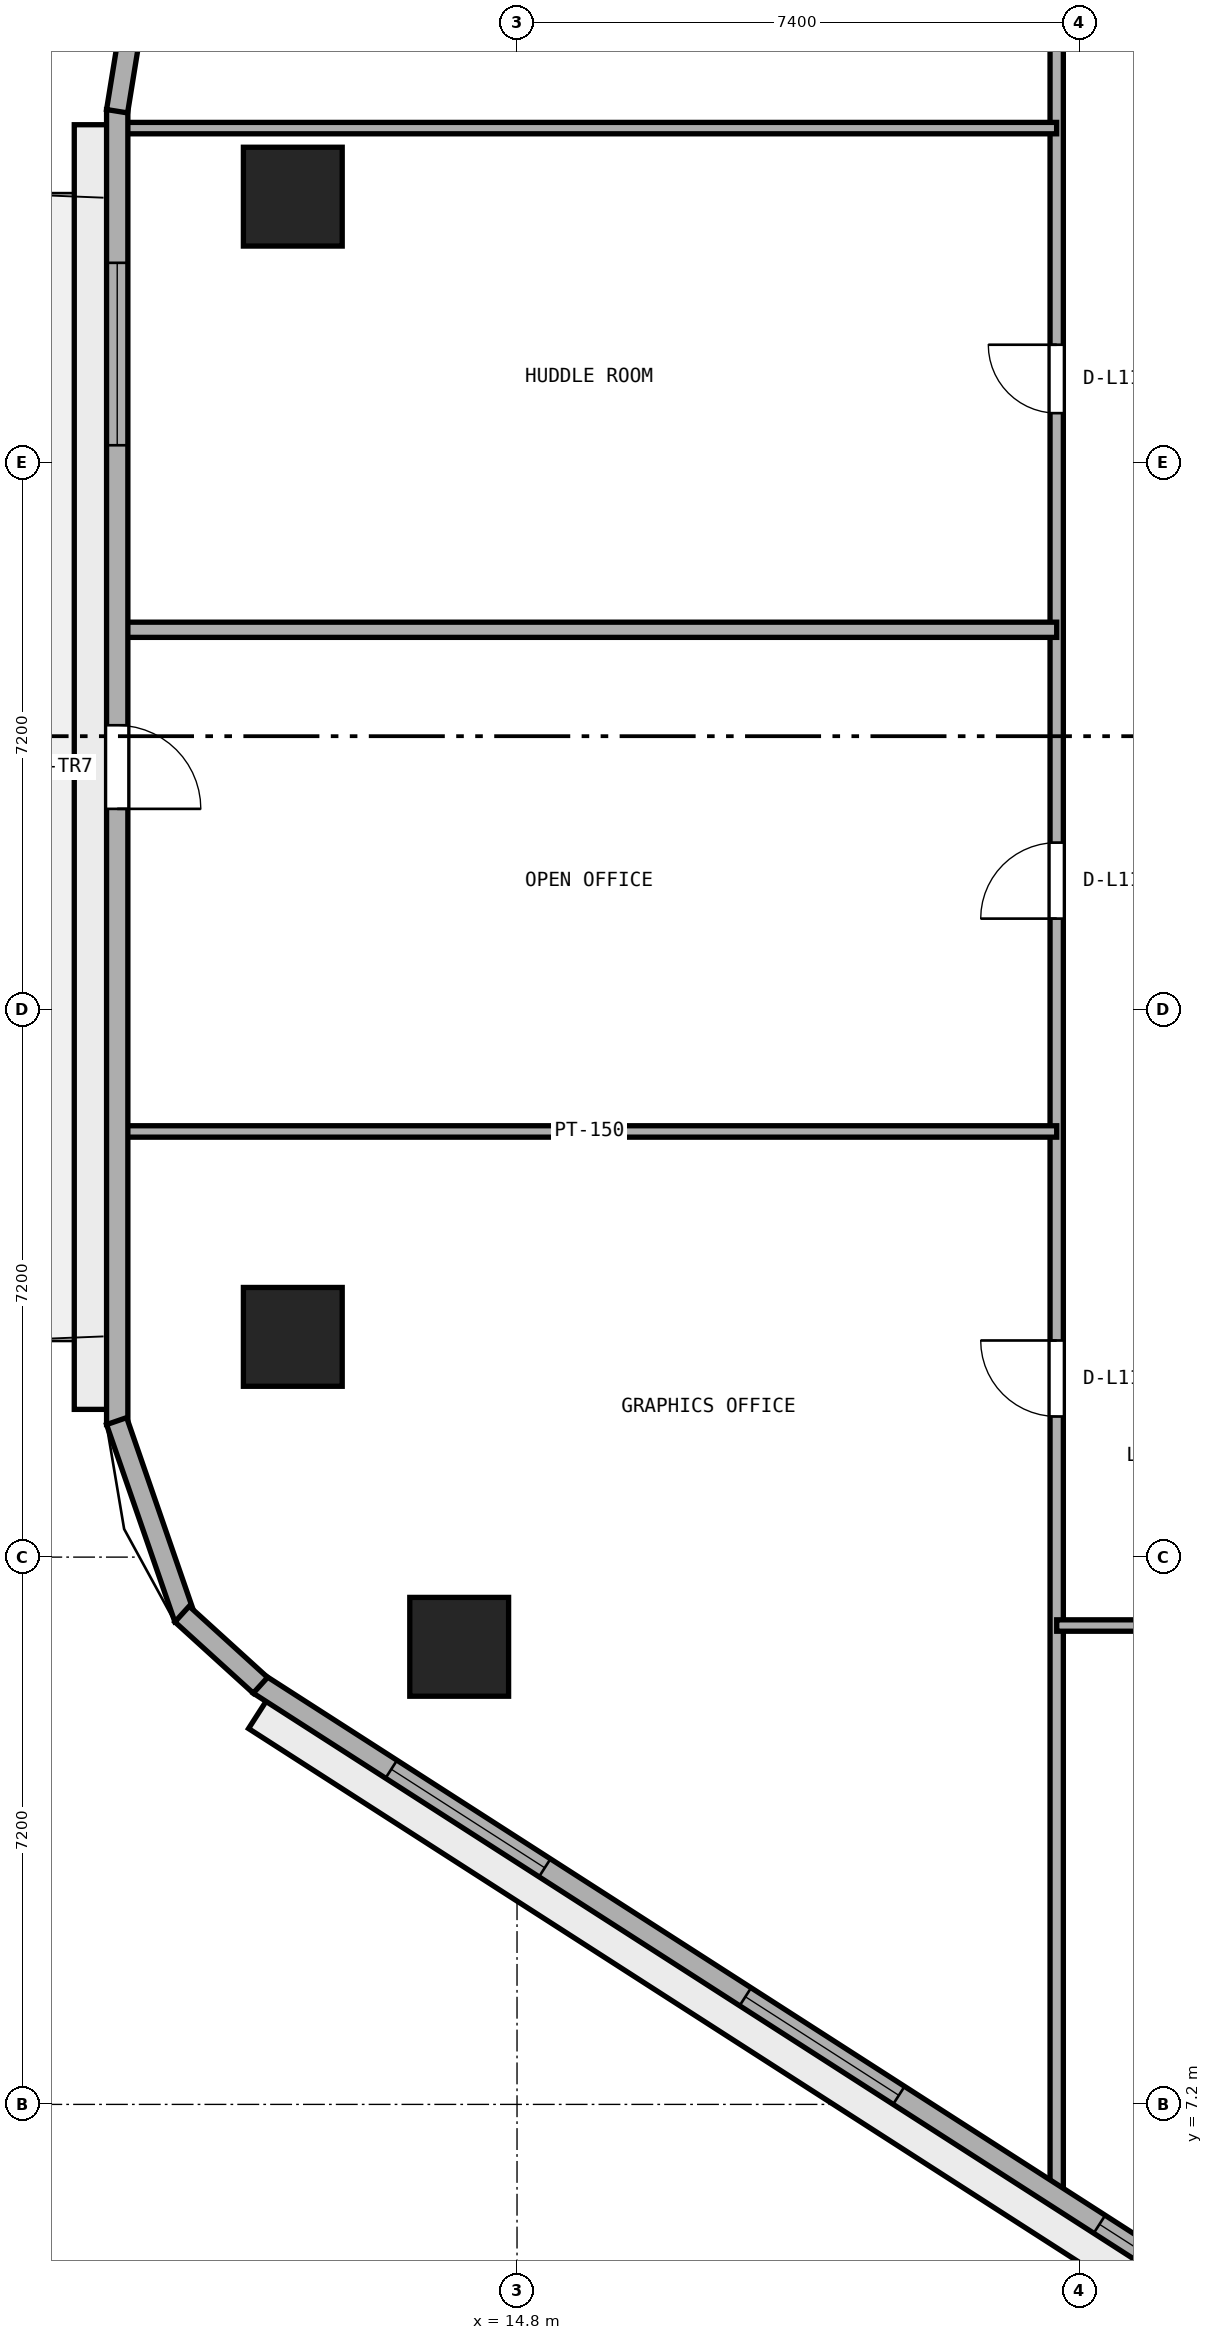
"""IFC4 building model, lengths in metres.
Left out: names, types, materials, properties, quantities, classifications, styles, units other than length and angle.
Written with IfcOpenShell. Run it as: python <this file> out.ifc"""

import sys

from ifc_helpers import new_model, si_unit, direction, frame, frame_2d, origin, origin_2d, place, context, subcontext, project, spatial, rectangle, extrude, element, fill, save


model = new_model("IFC4")
c1 = context("Model", 3, precision=1e-05, world=origin(), true_north=direction((0.0, 1.0)))
c2 = subcontext(c1, "Body", "Model", "MODEL_VIEW")
j1 = project(units=[si_unit("LENGTHUNIT", "METRE"), si_unit("PLANEANGLEUNIT", "RADIAN")], contexts=[c1])
p1 = place(None, origin())
s1 = spatial("IfcSite", under=j1, at=p1, CompositionType="ELEMENT")
p2 = place(p1, origin())
s2 = spatial("IfcBuilding", under=s1, at=p2, CompositionType="ELEMENT")
p3 = place(p2, frame((0.0, 0.0, 47.8)))
s3 = spatial("IfcBuildingStorey", under=s2, at=p3, CompositionType="ELEMENT", Elevation=47.8)
for number, where, z_axis, x_axis in (
    (1, (11.85, 32.298, 0.0), (0.0, 0.0, 1.0), (1.0, 0.0, 0.0)),
    (2, (11.85, 17.298, 0.0), (0.0, 0.0, 1.0), (1.0, 0.0, 0.0)),
    (3, (14.039, 13.22, 0.0), (0.0, 0.0, 1.0), (1.0, 0.0, 0.0)),
):
    element("IfcColumn", number, at=place(p3, frame(where, z_axis=z_axis, x_axis=x_axis)), inside=s3, PredefinedType="COLUMN", context=c2, shape_type="SweptSolid", body=[
        extrude(rectangle(XDim=1.3, YDim=1.3, at=origin_2d()), origin(), (0.0, 0.0, 1.0), 3.8),
    ])
p4 = place(p3, frame((21.9, 5.958, 0.0), z_axis=(0.0, 0.0, 1.0), x_axis=(0.0, 1.0, 0.0)))
e4 = element("IfcWall", 4, at=p4, inside=s3, PredefinedType="PARTITIONING", context=c2, shape_type="SweptSolid", body=[
    extrude(rectangle(XDim=30.942, YDim=0.175, at=frame_2d((15.471, 0.0))), origin(), (0.0, 0.0, 1.0), 3.525),
])
p5 = place(p4, frame((10.292, 0.0, 0.0)))
e5 = element("IfcOpeningElement", 5, at=p5, cuts=e4, PredefinedType="OPENING", context=c2, shape_type="SweptSolid", body=[
    extrude(rectangle(XDim=1.0, YDim=2.12, at=frame_2d((0.5, 1.06))), frame((0.0, 0.097, 0.0), z_axis=(0.0, -1.0, 0.0), x_axis=(1.0, 0.0, 0.0)), (0.0, 0.0, 1.0), 0.195),
])
p6 = place(p4, frame((16.842, 0.0, 0.0)))
e6 = element("IfcOpeningElement", 6, at=p6, cuts=e4, PredefinedType="OPENING", context=c2, shape_type="SweptSolid", body=[
    extrude(rectangle(XDim=1.0, YDim=2.12, at=frame_2d((0.5, 1.06))), frame((0.0, 0.097, 0.0), z_axis=(0.0, -1.0, 0.0), x_axis=(1.0, 0.0, 0.0)), (0.0, 0.0, 1.0), 0.195),
])
p7 = place(p4, frame((23.492, 0.0, 0.0)))
e7 = element("IfcOpeningElement", 7, at=p7, cuts=e4, PredefinedType="OPENING", context=c2, shape_type="SweptSolid", body=[
    extrude(rectangle(XDim=0.9, YDim=2.1, at=frame_2d((0.45, 1.05))), frame((0.0, 0.097, 0.0), z_axis=(0.0, -1.0, 0.0), x_axis=(1.0, 0.0, 0.0)), (0.0, 0.0, 1.0), 0.195),
])
p8 = place(p3, frame((21.9, 13.5, 0.0), z_axis=(0.0, 0.0, 1.0), x_axis=(1.0, 0.0, 0.0)))
e8 = element("IfcWall", 8, at=p8, inside=s3, PredefinedType="PARTITIONING", context=c2, shape_type="SweptSolid", body=[
    extrude(rectangle(XDim=30.2, YDim=0.15, at=frame_2d((15.1, 0.0))), origin(), (0.0, 0.0, 1.0), 3.525),
])
p9 = place(p8, frame((14.6, 0.0, 0.0)))
e9 = element("IfcOpeningElement", 9, at=p9, cuts=e8, PredefinedType="OPENING", context=c2, shape_type="SweptSolid", body=[
    extrude(rectangle(XDim=1.0, YDim=2.12, at=frame_2d((0.5, 1.06))), frame((0.0, 0.085, 0.0), z_axis=(0.0, -1.0, 0.0), x_axis=(1.0, 0.0, 0.0)), (0.0, 0.0, 1.0), 0.17),
])
p10 = place(p3, frame((9.605, 20.0, 0.0), z_axis=(0.0, 0.0, 1.0), x_axis=(1.0, 0.0, 0.0)))
e10 = element("IfcWall", 10, at=p10, inside=s3, PredefinedType="PARTITIONING", context=c2, shape_type="SweptSolid", body=[
    extrude(rectangle(XDim=12.295, YDim=0.15, at=frame_2d((6.147, 0.0))), origin(), (0.0, 0.0, 1.0), 3.525),
])
p11 = place(p3, frame((9.605, 26.6, 0.0), z_axis=(0.0, 0.0, 1.0), x_axis=(1.0, 0.0, 0.0)))
e11 = element("IfcWall", 11, at=p11, inside=s3, PredefinedType="PARTITIONING", context=c2, shape_type="SweptSolid", body=[
    extrude(rectangle(XDim=12.295, YDim=0.2, at=frame_2d((6.147, 0.0))), origin(), (0.0, 0.0, 1.0), 3.525),
])
p12 = place(p3, frame((9.605, 33.2, 0.0), z_axis=(0.0, 0.0, 1.0), x_axis=(1.0, 0.0, 0.0)))
e12 = element("IfcWall", 12, at=p12, inside=s3, PredefinedType="PARTITIONING", context=c2, shape_type="SweptSolid", body=[
    extrude(rectangle(XDim=12.294, YDim=0.15, at=frame_2d((6.147, 0.0))), origin(), (0.0, 0.0, 1.0), 3.525),
])
p13 = place(p3, frame((9.54, 33.444, 0.0), z_axis=(0.0, 0.0, 1.0), x_axis=(0.0, -1.0, 0.0)))
e13 = element("IfcWall", 13, at=p13, inside=s3, PredefinedType="STANDARD", context=c2, shape_type="SweptSolid", body=[
    extrude(rectangle(XDim=17.301, YDim=0.28, at=frame_2d((8.65, 0.0))), origin(), (0.0, 0.0, 1.0), 3.525),
])
p14 = place(p13, frame((8.1, 0.0, 0.0)))
e14 = element("IfcOpeningElement", 14, at=p14, cuts=e13, PredefinedType="OPENING", context=c2, shape_type="SweptSolid", body=[
    extrude(rectangle(XDim=1.1, YDim=2.2, at=frame_2d((0.55, 1.1))), frame((0.0, 0.15, 0.0), z_axis=(0.0, -1.0, 0.0), x_axis=(1.0, 0.0, 0.0)), (0.0, 0.0, 1.0), 0.3),
])
p15 = place(p13, frame((2.017, 0.0, 0.9)))
e15 = element("IfcOpeningElement", 15, at=p15, cuts=e13, PredefinedType="OPENING", context=c2, shape_type="SweptSolid", body=[
    extrude(rectangle(XDim=2.4, YDim=1.75, at=frame_2d((1.2, 0.875))), frame((0.0, 0.15, 0.0), z_axis=(0.0, -1.0, 0.0), x_axis=(1.0, 0.0, 0.0)), (0.0, 0.0, 1.0), 0.3),
])
p16 = place(p3, frame((11.405, 12.728, 0.0), z_axis=(0.0, 0.0, 1.0), x_axis=(0.841304564637, -0.540561402175, 0.0)))
e16 = element("IfcWall", 16, at=p16, inside=s3, PredefinedType="STANDARD", context=c2, shape_type="SweptSolid", body=[
    extrude(rectangle(XDim=17.612, YDim=0.28, at=frame_2d((8.806, 0.0))), origin(), (0.0, 0.0, 1.0), 3.525),
])
p17 = place(p16, frame((2.069, 0.0, 0.9)))
e17 = element("IfcOpeningElement", 17, at=p17, cuts=e16, PredefinedType="OPENING", context=c2, shape_type="SweptSolid", body=[
    extrude(rectangle(XDim=2.4, YDim=1.75, at=frame_2d((1.2, 0.875))), frame((0.0, 0.15, 0.0), z_axis=(0.0, -1.0, 0.0), x_axis=(1.0, 0.0, 0.0)), (0.0, 0.0, 1.0), 0.3),
])
p18 = place(p16, frame((7.606, 0.0, 0.9)))
e18 = element("IfcOpeningElement", 18, at=p18, cuts=e16, PredefinedType="OPENING", context=c2, shape_type="SweptSolid", body=[
    extrude(rectangle(XDim=2.4, YDim=1.75, at=frame_2d((1.2, 0.875))), frame((0.0, 0.15, 0.0), z_axis=(0.0, -1.0, 0.0), x_axis=(1.0, 0.0, 0.0)), (0.0, 0.0, 1.0), 0.3),
])
p19 = place(p16, frame((13.143, 0.0, 0.9)))
e19 = element("IfcOpeningElement", 19, at=p19, cuts=e16, PredefinedType="OPENING", context=c2, shape_type="SweptSolid", body=[
    extrude(rectangle(XDim=2.4, YDim=1.75, at=frame_2d((1.2, 0.875))), frame((0.0, 0.15, 0.0), z_axis=(0.0, -1.0, 0.0), x_axis=(1.0, 0.0, 0.0)), (0.0, 0.0, 1.0), 0.3),
])
p20 = place(p3, frame((9.753, 34.749, 0.0), z_axis=(0.0, 0.0, 1.0), x_axis=(-0.160037671962, -0.987110907423, 0.0)))
e20 = element("IfcWall", 20, at=p20, inside=s3, PredefinedType="STANDARD", context=c2, shape_type="SweptSolid", body=[
    extrude(rectangle(XDim=1.344, YDim=0.28, at=frame_2d((0.672, 0.0))), origin(), (0.0, 0.0, 1.0), 3.525),
])
p21 = place(p3, frame((9.532, 16.189, 0.0), z_axis=(0.0, 0.0, 1.0), x_axis=(0.32708309668, -0.944995580871, 0.0)))
e21 = element("IfcWall", 21, at=p21, inside=s3, PredefinedType="STANDARD", context=c2, shape_type="SweptSolid", body=[
    extrude(rectangle(XDim=2.748, YDim=0.28, at=frame_2d((1.374, 0.0))), origin(), (0.0, 0.0, 1.0), 3.525),
])
p22 = place(p3, frame((10.393, 13.651, 0.0), z_axis=(0.0, 0.0, 1.0), x_axis=(0.74003521851, -0.672568119498, 0.0)))
e22 = element("IfcWall", 22, at=p22, inside=s3, PredefinedType="STANDARD", context=c2, shape_type="SweptSolid", body=[
    extrude(rectangle(XDim=1.393, YDim=0.28, at=frame_2d((0.697, 0.0))), origin(), (0.0, 0.0, 1.0), 3.525),
])
p23 = place(p5, origin())
e23 = element("IfcDoor", 23, at=p23, inside=s3, OperationType="SINGLE_SWING_RIGHT", PredefinedType="DOOR", context=c2, shape_type="SweptSolid", body=[
    extrude(rectangle(XDim=1.0, YDim=2.12, at=frame_2d((0.5, 1.06))), frame((0.0, 0.025, 0.0), z_axis=(0.0, -1.0, 0.0), x_axis=(1.0, 0.0, 0.0)), (0.0, 0.0, 1.0), 0.05),
])
fill(e5, e23)
p24 = place(p6, origin())
e24 = element("IfcDoor", 24, at=p24, inside=s3, OperationType="SINGLE_SWING_LEFT", PredefinedType="DOOR", context=c2, shape_type="SweptSolid", body=[
    extrude(rectangle(XDim=1.0, YDim=2.12, at=frame_2d((0.5, 1.06))), frame((0.0, 0.025, 0.0), z_axis=(0.0, -1.0, 0.0), x_axis=(1.0, 0.0, 0.0)), (0.0, 0.0, 1.0), 0.05),
])
fill(e6, e24)
p25 = place(p7, origin())
e25 = element("IfcDoor", 25, at=p25, inside=s3, OperationType="SINGLE_SWING_RIGHT", PredefinedType="DOOR", context=c2, shape_type="SweptSolid", body=[
    extrude(rectangle(XDim=0.9, YDim=2.1, at=frame_2d((0.45, 1.05))), frame((0.0, 0.025, 0.0), z_axis=(0.0, -1.0, 0.0), x_axis=(1.0, 0.0, 0.0)), (0.0, 0.0, 1.0), 0.05),
])
fill(e7, e25)
p26 = place(p14, origin())
e26 = element("IfcDoor", 26, at=p26, inside=s3, OperationType="SINGLE_SWING_RIGHT", PredefinedType="DOOR", context=c2, shape_type="SweptSolid", body=[
    extrude(rectangle(XDim=1.1, YDim=2.2, at=frame_2d((0.55, 1.1))), frame((0.0, 0.025, 0.0), z_axis=(0.0, -1.0, 0.0), x_axis=(1.0, 0.0, 0.0)), (0.0, 0.0, 1.0), 0.05),
])
fill(e14, e26)
p27 = place(p15, origin())
e27 = element("IfcWindow", 27, at=p27, inside=s3, PartitioningType="SINGLE_PANEL", PredefinedType="WINDOW", context=c2, shape_type="SweptSolid", body=[
    extrude(rectangle(XDim=2.4, YDim=1.75, at=frame_2d((1.2, 0.875))), frame((0.0, 0.03, 0.0), z_axis=(0.0, -1.0, 0.0), x_axis=(1.0, 0.0, 0.0)), (0.0, 0.0, 1.0), 0.06),
])
fill(e15, e27)
p28 = place(p17, origin())
e28 = element("IfcWindow", 28, at=p28, inside=s3, PartitioningType="SINGLE_PANEL", PredefinedType="WINDOW", context=c2, shape_type="SweptSolid", body=[
    extrude(rectangle(XDim=2.4, YDim=1.75, at=frame_2d((1.2, 0.875))), frame((0.0, 0.03, 0.0), z_axis=(0.0, -1.0, 0.0), x_axis=(1.0, 0.0, 0.0)), (0.0, 0.0, 1.0), 0.06),
])
fill(e17, e28)
p29 = place(p18, origin())
e29 = element("IfcWindow", 29, at=p29, inside=s3, PartitioningType="SINGLE_PANEL", PredefinedType="WINDOW", context=c2, shape_type="SweptSolid", body=[
    extrude(rectangle(XDim=2.4, YDim=1.75, at=frame_2d((1.2, 0.875))), frame((0.0, 0.03, 0.0), z_axis=(0.0, -1.0, 0.0), x_axis=(1.0, 0.0, 0.0)), (0.0, 0.0, 1.0), 0.06),
])
fill(e18, e29)
p30 = place(p19, origin())
e30 = element("IfcWindow", 30, at=p30, inside=s3, PartitioningType="SINGLE_PANEL", PredefinedType="WINDOW", context=c2, shape_type="SweptSolid", body=[
    extrude(rectangle(XDim=2.4, YDim=1.75, at=frame_2d((1.2, 0.875))), frame((0.0, 0.03, 0.0), z_axis=(0.0, -1.0, 0.0), x_axis=(1.0, 0.0, 0.0)), (0.0, 0.0, 1.0), 0.06),
])
fill(e19, e30)
save(model, sys.argv[1])
